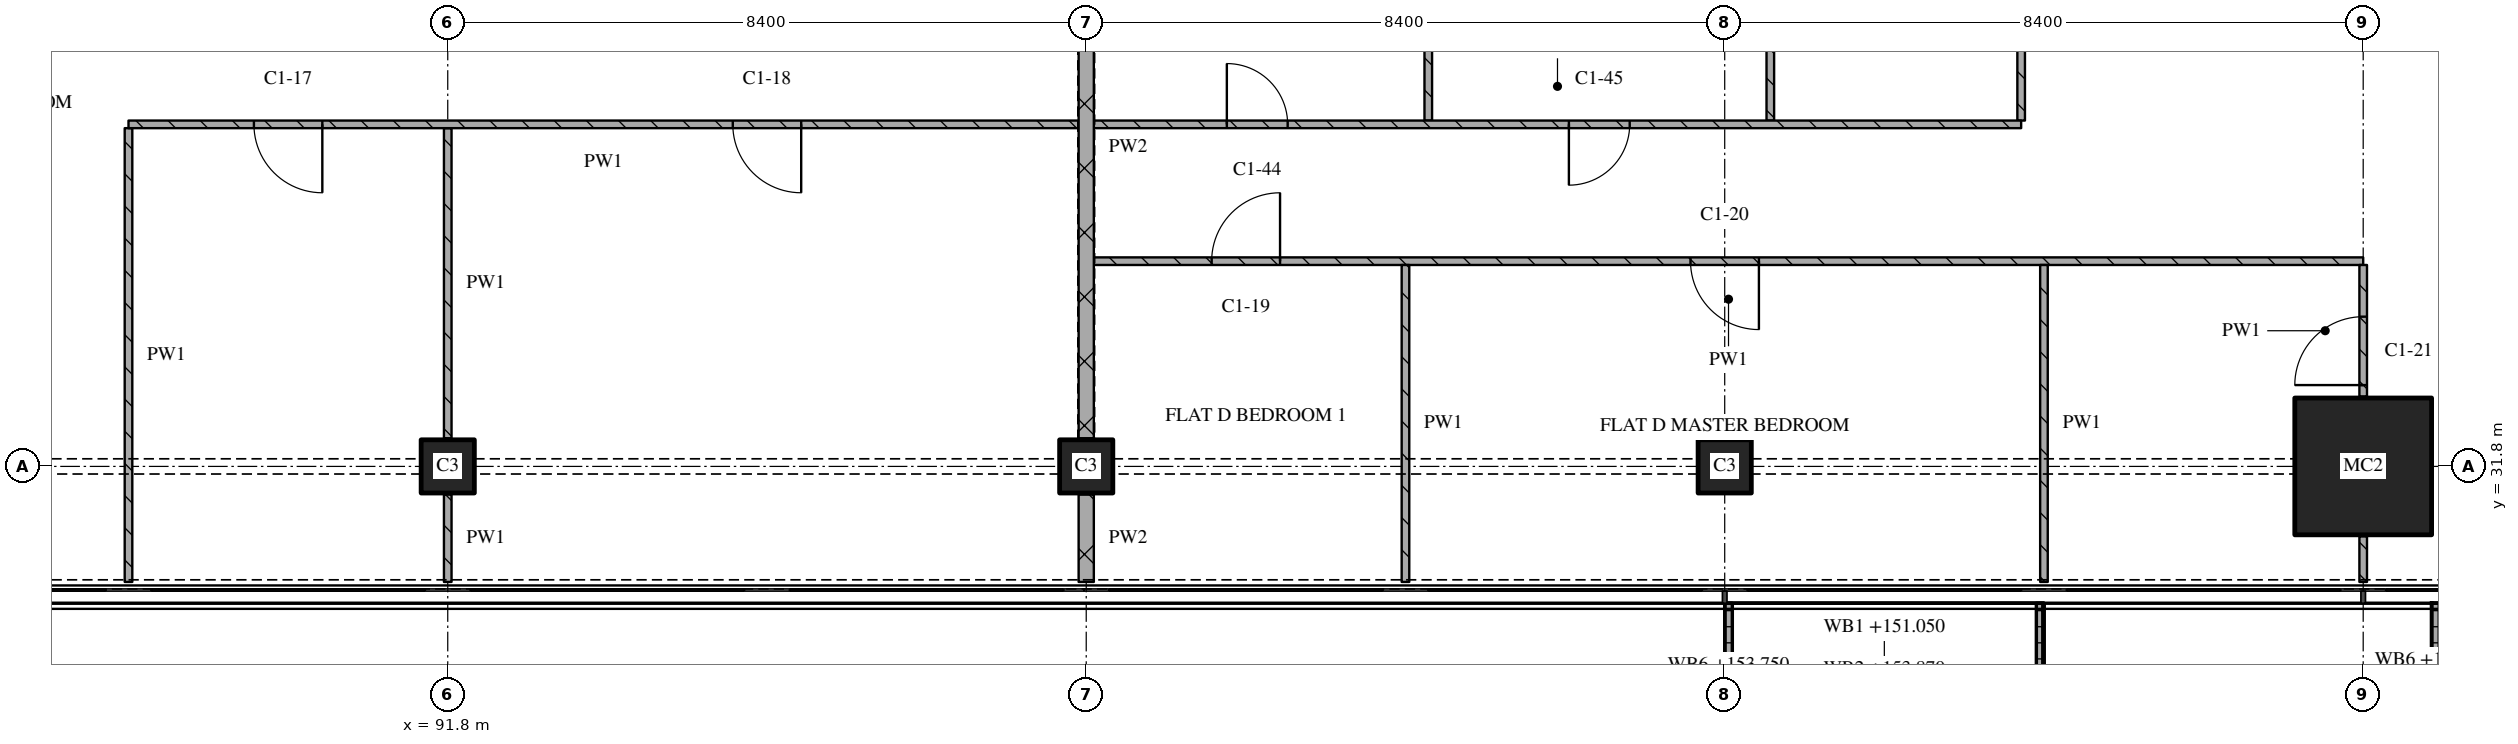
"""IFC4 building model, lengths in metres.
Left out: names, types, materials, properties, quantities, classifications, styles, units other than length and angle.
Written with IfcOpenShell. Run it as: python <this file> out.ifc"""

import sys

from ifc_helpers import new_model, si_unit, direction, frame, frame_2d, origin, origin_2d, place, context, subcontext, project, spatial, polyline, rectangle, outline, extrude, element, fill, save


model = new_model("IFC4")
c1 = context("Model", 3, precision=1e-05, world=origin(), true_north=direction((0.0, 1.0)))
c2 = subcontext(c1, "Body", "Model", "MODEL_VIEW")
j1 = project(units=[si_unit("LENGTHUNIT", "METRE"), si_unit("PLANEANGLEUNIT", "RADIAN")], contexts=[c1])
p1 = place(None, origin())
s1 = spatial("IfcSite", under=j1, at=p1, CompositionType="ELEMENT")
p2 = place(p1, origin())
s2 = spatial("IfcBuilding", under=s1, at=p2, CompositionType="ELEMENT")
p3 = place(p2, frame((0.0, 0.0, 151.05)))
s3 = spatial("IfcBuildingStorey", under=s2, at=p3, CompositionType="ELEMENT", Elevation=151.05)
for number, where, z_axis, x_axis in (
    (1, (91.8, 31.8, 0.0), (0.0, 0.0, 1.0), (1.0, 0.0, 0.0)),
    (2, (100.2, 31.8, 0.0), (0.0, 0.0, 1.0), (1.0, 0.0, 0.0)),
    (3, (108.6, 31.8, 0.0), (0.0, 0.0, 1.0), (1.0, 0.0, 0.0)),
):
    element("IfcColumn", number, at=place(p3, frame(where, z_axis=z_axis, x_axis=x_axis)), inside=s3, PredefinedType="COLUMN", context=c2, shape_type="SweptSolid", body=[
        extrude(rectangle(XDim=0.7, YDim=0.7, at=origin_2d()), origin(), (0.0, 0.0, 1.0), 3.6),
    ])
p4 = place(p3, frame((117.0, 31.8, 0.0), z_axis=(0.0, 0.0, 1.0), x_axis=(1.0, 0.0, 0.0)))
e4 = element("IfcColumn", 4, at=p4, inside=s3, PredefinedType="COLUMN", context=c2, shape_type="SweptSolid", body=[
    extrude(rectangle(XDim=1.8, YDim=1.8, at=origin_2d()), origin(), (0.0, 0.0, 1.0), 3.6),
])
p5 = place(p3, origin())
e5 = element("IfcWall", 5, at=p5, inside=s3, PredefinedType="SOLIDWALL", context=c2, shape_type="SweptSolid", body=[
    extrude(outline(polyline([(108.6, 30.0), (108.7, 30.0), (108.7, 28.367), (112.7, 28.367), (112.7, 30.0), (112.8, 30.0), (112.8, 28.267), (108.6, 28.267), (108.6, 30.0)])), origin(), (0.0, 0.0, 1.0), 1.0),
])
p6 = place(p3, origin())
e6 = element("IfcWall", 6, at=p6, inside=s3, PredefinedType="SOLIDWALL", context=c2, shape_type="SweptSolid", body=[
    extrude(outline(polyline([(117.9, 30.0), (118.0, 30.0), (118.0, 28.5), (120.2, 28.5), (120.2, 30.0), (120.3, 30.0), (120.3, 28.4), (117.9, 28.4), (117.9, 30.0)])), origin(), (0.0, 0.0, 1.0), 1.0),
])
p7 = place(p3, frame((117.0, 34.5, 0.0), z_axis=(0.0, 0.0, 1.0), x_axis=(-1.0, 0.0, 0.0)))
e7 = element("IfcWall", 7, at=p7, inside=s3, PredefinedType="PARTITIONING", context=c2, shape_type="SweptSolid", body=[
    extrude(rectangle(XDim=16.7, YDim=0.1, at=frame_2d((8.35, 0.0))), origin(), (0.0, 0.0, 1.0), 3.32),
])
p8 = place(p7, frame((7.95, 0.0, 0.0)))
e8 = element("IfcOpeningElement", 8, at=p8, cuts=e7, PredefinedType="OPENING", context=c2, shape_type="SweptSolid", body=[
    extrude(rectangle(XDim=0.9, YDim=2.1, at=frame_2d((0.45, 1.05))), frame((0.0, 0.06, 0.0), z_axis=(0.0, -1.0, 0.0), x_axis=(1.0, 0.0, 0.0)), (0.0, 0.0, 1.0), 0.12),
])
p9 = place(p7, frame((14.25, 0.0, 0.0)))
e9 = element("IfcOpeningElement", 9, at=p9, cuts=e7, PredefinedType="OPENING", context=c2, shape_type="SweptSolid", body=[
    extrude(rectangle(XDim=0.9, YDim=2.1, at=frame_2d((0.45, 1.05))), frame((0.0, 0.06, 0.0), z_axis=(0.0, -1.0, 0.0), x_axis=(1.0, 0.0, 0.0)), (0.0, 0.0, 1.0), 0.12),
])
p10 = place(p3, frame((87.6, 36.25, 0.0), z_axis=(0.0, 0.0, 1.0), x_axis=(0.0, -1.0, 0.0)))
e10 = element("IfcWall", 10, at=p10, inside=s3, PredefinedType="PARTITIONING", context=c2, shape_type="SweptSolid", body=[
    extrude(rectangle(XDim=5.97, YDim=0.1, at=frame_2d((2.985, 0.0))), origin(), (0.0, 0.0, 1.0), 3.32),
])
p11 = place(p3, frame((91.8, 31.43, 0.0), z_axis=(0.0, 0.0, 1.0), x_axis=(0.0, -1.0, 0.0)))
e11 = element("IfcWall", 11, at=p11, inside=s3, PredefinedType="PARTITIONING", context=c2, shape_type="SweptSolid", body=[
    extrude(rectangle(XDim=1.15, YDim=0.1, at=frame_2d((0.575, 0.0))), origin(), (0.0, 0.0, 1.0), 3.32),
])
p12 = place(p3, frame((91.8, 36.25, 0.0), z_axis=(0.0, 0.0, 1.0), x_axis=(0.0, -1.0, 0.0)))
e12 = element("IfcWall", 12, at=p12, inside=s3, PredefinedType="PARTITIONING", context=c2, shape_type="SweptSolid", body=[
    extrude(rectangle(XDim=4.08, YDim=0.1, at=frame_2d((2.04, 0.0))), origin(), (0.0, 0.0, 1.0), 3.32),
])
p13 = place(p3, frame((100.2, 31.43, 0.0), z_axis=(0.0, 0.0, 1.0), x_axis=(0.0, -1.0, 0.0)))
e13 = element("IfcWall", 13, at=p13, inside=s3, PredefinedType="PARTITIONING", context=c2, shape_type="SweptSolid", body=[
    extrude(rectangle(XDim=1.15, YDim=0.2, at=frame_2d((0.575, 0.0))), origin(), (0.0, 0.0, 1.0), 3.32),
])
p14 = place(p3, frame((100.2, 39.83, 0.0), z_axis=(0.0, 0.0, 1.0), x_axis=(0.0, -1.0, 0.0)))
e14 = element("IfcWall", 14, at=p14, inside=s3, PredefinedType="PARTITIONING", context=c2, shape_type="SweptSolid", body=[
    extrude(rectangle(XDim=7.66, YDim=0.2, at=frame_2d((3.83, 0.0))), origin(), (0.0, 0.0, 1.0), 2.72),
])
p15 = place(p3, frame((104.4, 34.45, 0.0), z_axis=(0.0, 0.0, 1.0), x_axis=(0.0, -1.0, 0.0)))
e15 = element("IfcWall", 15, at=p15, inside=s3, PredefinedType="PARTITIONING", context=c2, shape_type="SweptSolid", body=[
    extrude(rectangle(XDim=4.17, YDim=0.1, at=frame_2d((2.085, 0.0))), origin(), (0.0, 0.0, 1.0), 3.32),
])
for number, where, z_axis, x_axis in (
    (16, (104.7, 40.7, 0.0), (0.0, 0.0, 1.0), (0.0, -1.0, 0.0)),
    (17, (109.2, 40.7, 0.0), (0.0, 0.0, 1.0), (0.0, -1.0, 0.0)),
):
    element("IfcWall", number, at=place(p3, frame(where, z_axis=z_axis, x_axis=x_axis)), inside=s3, PredefinedType="PARTITIONING", context=c2, shape_type="SweptSolid", body=[
        extrude(rectangle(XDim=4.35, YDim=0.1, at=frame_2d((2.175, 0.0))), origin(), (0.0, 0.0, 1.0), 3.32),
    ])
p16 = place(p3, frame((112.5, 36.35, 0.0), z_axis=(0.0, 0.0, 1.0), x_axis=(0.0, 1.0, 0.0)))
e18 = element("IfcWall", 18, at=p16, inside=s3, PredefinedType="PARTITIONING", context=c2, shape_type="SweptSolid", body=[
    extrude(rectangle(XDim=4.35, YDim=0.1, at=frame_2d((2.175, 0.0))), origin(), (0.0, 0.0, 1.0), 3.32),
])
p17 = place(p16, frame((1.75, 0.0, 0.0)))
e19 = element("IfcOpeningElement", 19, at=p17, cuts=e18, PredefinedType="OPENING", context=c2, shape_type="SweptSolid", body=[
    extrude(rectangle(XDim=0.9, YDim=2.1, at=frame_2d((0.45, 1.05))), frame((0.0, 0.06, 0.0), z_axis=(0.0, -1.0, 0.0), x_axis=(1.0, 0.0, 0.0)), (0.0, 0.0, 1.0), 0.12),
])
p18 = place(p3, frame((112.8, 34.45, 0.0), z_axis=(0.0, 0.0, 1.0), x_axis=(0.0, -1.0, 0.0)))
e20 = element("IfcWall", 20, at=p18, inside=s3, PredefinedType="PARTITIONING", context=c2, shape_type="SweptSolid", body=[
    extrude(rectangle(XDim=4.17, YDim=0.1, at=frame_2d((2.085, 0.0))), origin(), (0.0, 0.0, 1.0), 3.32),
])
p19 = place(p3, frame((117.0, 30.88, 0.0), z_axis=(0.0, 0.0, 1.0), x_axis=(0.0, -1.0, 0.0)))
e21 = element("IfcWall", 21, at=p19, inside=s3, PredefinedType="PARTITIONING", context=c2, shape_type="SweptSolid", body=[
    extrude(rectangle(XDim=0.6, YDim=0.1, at=frame_2d((0.3, 0.0))), origin(), (0.0, 0.0, 1.0), 3.32),
])
p20 = place(p3, frame((117.0, 32.72, 0.0), z_axis=(0.0, 0.0, 1.0), x_axis=(0.0, 1.0, 0.0)))
e22 = element("IfcWall", 22, at=p20, inside=s3, PredefinedType="PARTITIONING", context=c2, shape_type="SweptSolid", body=[
    extrude(rectangle(XDim=1.73, YDim=0.1, at=frame_2d((0.865, 0.0))), origin(), (0.0, 0.0, 1.0), 3.32),
])
p21 = place(p20, frame((0.15, 0.0, 0.0)))
e23 = element("IfcOpeningElement", 23, at=p21, cuts=e22, PredefinedType="OPENING", context=c2, shape_type="SweptSolid", body=[
    extrude(rectangle(XDim=0.9, YDim=2.1, at=frame_2d((0.45, 1.05))), frame((0.0, 0.06, 0.0), z_axis=(0.0, -1.0, 0.0), x_axis=(1.0, 0.0, 0.0)), (0.0, 0.0, 1.0), 0.12),
])
p22 = place(p3, frame((100.1, 36.3, 0.0), z_axis=(0.0, 0.0, 1.0), x_axis=(-1.0, 0.0, 0.0)))
e24 = element("IfcWall", 24, at=p22, inside=s3, PredefinedType="PARTITIONING", context=c2, shape_type="SweptSolid", body=[
    extrude(rectangle(XDim=12.5, YDim=0.1, at=frame_2d((6.25, 0.0))), origin(), (0.0, 0.0, 1.0), 3.32),
])
p23 = place(p22, frame((3.65, 0.0, 0.0)))
e25 = element("IfcOpeningElement", 25, at=p23, cuts=e24, PredefinedType="OPENING", context=c2, shape_type="SweptSolid", body=[
    extrude(rectangle(XDim=0.9, YDim=2.1, at=frame_2d((0.45, 1.05))), frame((0.0, 0.06, 0.0), z_axis=(0.0, -1.0, 0.0), x_axis=(1.0, 0.0, 0.0)), (0.0, 0.0, 1.0), 0.12),
])
p24 = place(p22, frame((9.95, 0.0, 0.0)))
e26 = element("IfcOpeningElement", 26, at=p24, cuts=e24, PredefinedType="OPENING", context=c2, shape_type="SweptSolid", body=[
    extrude(rectangle(XDim=0.9, YDim=2.1, at=frame_2d((0.45, 1.05))), frame((0.0, 0.06, 0.0), z_axis=(0.0, -1.0, 0.0), x_axis=(1.0, 0.0, 0.0)), (0.0, 0.0, 1.0), 0.12),
])
p25 = place(p3, frame((100.3, 36.3, 0.0), z_axis=(0.0, 0.0, 1.0), x_axis=(1.0, 0.0, 0.0)))
e27 = element("IfcWall", 27, at=p25, inside=s3, PredefinedType="PARTITIONING", context=c2, shape_type="SweptSolid", body=[
    extrude(rectangle(XDim=12.2, YDim=0.1, at=frame_2d((6.1, 0.0))), origin(), (0.0, 0.0, 1.0), 3.32),
])
p26 = place(p25, frame((1.75, 0.0, 0.0)))
e28 = element("IfcOpeningElement", 28, at=p26, cuts=e27, PredefinedType="OPENING", context=c2, shape_type="SweptSolid", body=[
    extrude(rectangle(XDim=0.8, YDim=2.1, at=frame_2d((0.4, 1.05))), frame((0.0, 0.06, 0.0), z_axis=(0.0, -1.0, 0.0), x_axis=(1.0, 0.0, 0.0)), (0.0, 0.0, 1.0), 0.12),
])
p27 = place(p25, frame((6.25, 0.0, 0.0)))
e29 = element("IfcOpeningElement", 29, at=p27, cuts=e27, PredefinedType="OPENING", context=c2, shape_type="SweptSolid", body=[
    extrude(rectangle(XDim=0.8, YDim=2.1, at=frame_2d((0.4, 1.05))), frame((0.0, 0.06, 0.0), z_axis=(0.0, -1.0, 0.0), x_axis=(1.0, 0.0, 0.0)), (0.0, 0.0, 1.0), 0.12),
])
p28 = place(p8, origin())
e30 = element("IfcDoor", 30, at=p28, inside=s3, OperationType="SINGLE_SWING_LEFT", PredefinedType="DOOR", context=c2, shape_type="SweptSolid", body=[
    extrude(rectangle(XDim=0.9, YDim=2.1, at=frame_2d((0.45, 1.05))), frame((0.0, 0.025, 0.0), z_axis=(0.0, -1.0, 0.0), x_axis=(1.0, 0.0, 0.0)), (0.0, 0.0, 1.0), 0.05),
])
fill(e8, e30)
p29 = place(p9, origin())
e31 = element("IfcDoor", 31, at=p29, inside=s3, OperationType="SINGLE_SWING_RIGHT", PredefinedType="DOOR", context=c2, shape_type="SweptSolid", body=[
    extrude(rectangle(XDim=0.9, YDim=2.1, at=frame_2d((0.45, 1.05))), frame((0.0, 0.025, 0.0), z_axis=(0.0, -1.0, 0.0), x_axis=(1.0, 0.0, 0.0)), (0.0, 0.0, 1.0), 0.05),
])
fill(e9, e31)
p30 = place(p21, origin())
e32 = element("IfcDoor", 32, at=p30, inside=s3, OperationType="SINGLE_SWING_LEFT", PredefinedType="DOOR", context=c2, shape_type="SweptSolid", body=[
    extrude(rectangle(XDim=0.9, YDim=2.1, at=frame_2d((0.45, 1.05))), frame((0.0, 0.025, 0.0), z_axis=(0.0, -1.0, 0.0), x_axis=(1.0, 0.0, 0.0)), (0.0, 0.0, 1.0), 0.05),
])
fill(e23, e32)
p31 = place(p23, origin())
e33 = element("IfcDoor", 33, at=p31, inside=s3, OperationType="SINGLE_SWING_LEFT", PredefinedType="DOOR", context=c2, shape_type="SweptSolid", body=[
    extrude(rectangle(XDim=0.9, YDim=2.1, at=frame_2d((0.45, 1.05))), frame((0.0, 0.025, 0.0), z_axis=(0.0, -1.0, 0.0), x_axis=(1.0, 0.0, 0.0)), (0.0, 0.0, 1.0), 0.05),
])
fill(e25, e33)
p32 = place(p24, origin())
e34 = element("IfcDoor", 34, at=p32, inside=s3, OperationType="SINGLE_SWING_LEFT", PredefinedType="DOOR", context=c2, shape_type="SweptSolid", body=[
    extrude(rectangle(XDim=0.9, YDim=2.1, at=frame_2d((0.45, 1.05))), frame((0.0, 0.025, 0.0), z_axis=(0.0, -1.0, 0.0), x_axis=(1.0, 0.0, 0.0)), (0.0, 0.0, 1.0), 0.05),
])
fill(e26, e34)
p33 = place(p26, origin())
e35 = element("IfcDoor", 35, at=p33, inside=s3, OperationType="SINGLE_SWING_LEFT", PredefinedType="DOOR", context=c2, shape_type="SweptSolid", body=[
    extrude(rectangle(XDim=0.8, YDim=2.1, at=frame_2d((0.4, 1.05))), frame((0.0, 0.025, 0.0), z_axis=(0.0, -1.0, 0.0), x_axis=(1.0, 0.0, 0.0)), (0.0, 0.0, 1.0), 0.05),
])
fill(e28, e35)
p34 = place(p27, origin())
e36 = element("IfcDoor", 36, at=p34, inside=s3, OperationType="SINGLE_SWING_RIGHT", PredefinedType="DOOR", context=c2, shape_type="SweptSolid", body=[
    extrude(rectangle(XDim=0.8, YDim=2.1, at=frame_2d((0.4, 1.05))), frame((0.0, 0.025, 0.0), z_axis=(0.0, -1.0, 0.0), x_axis=(1.0, 0.0, 0.0)), (0.0, 0.0, 1.0), 0.05),
])
fill(e29, e36)
save(model, sys.argv[1])
